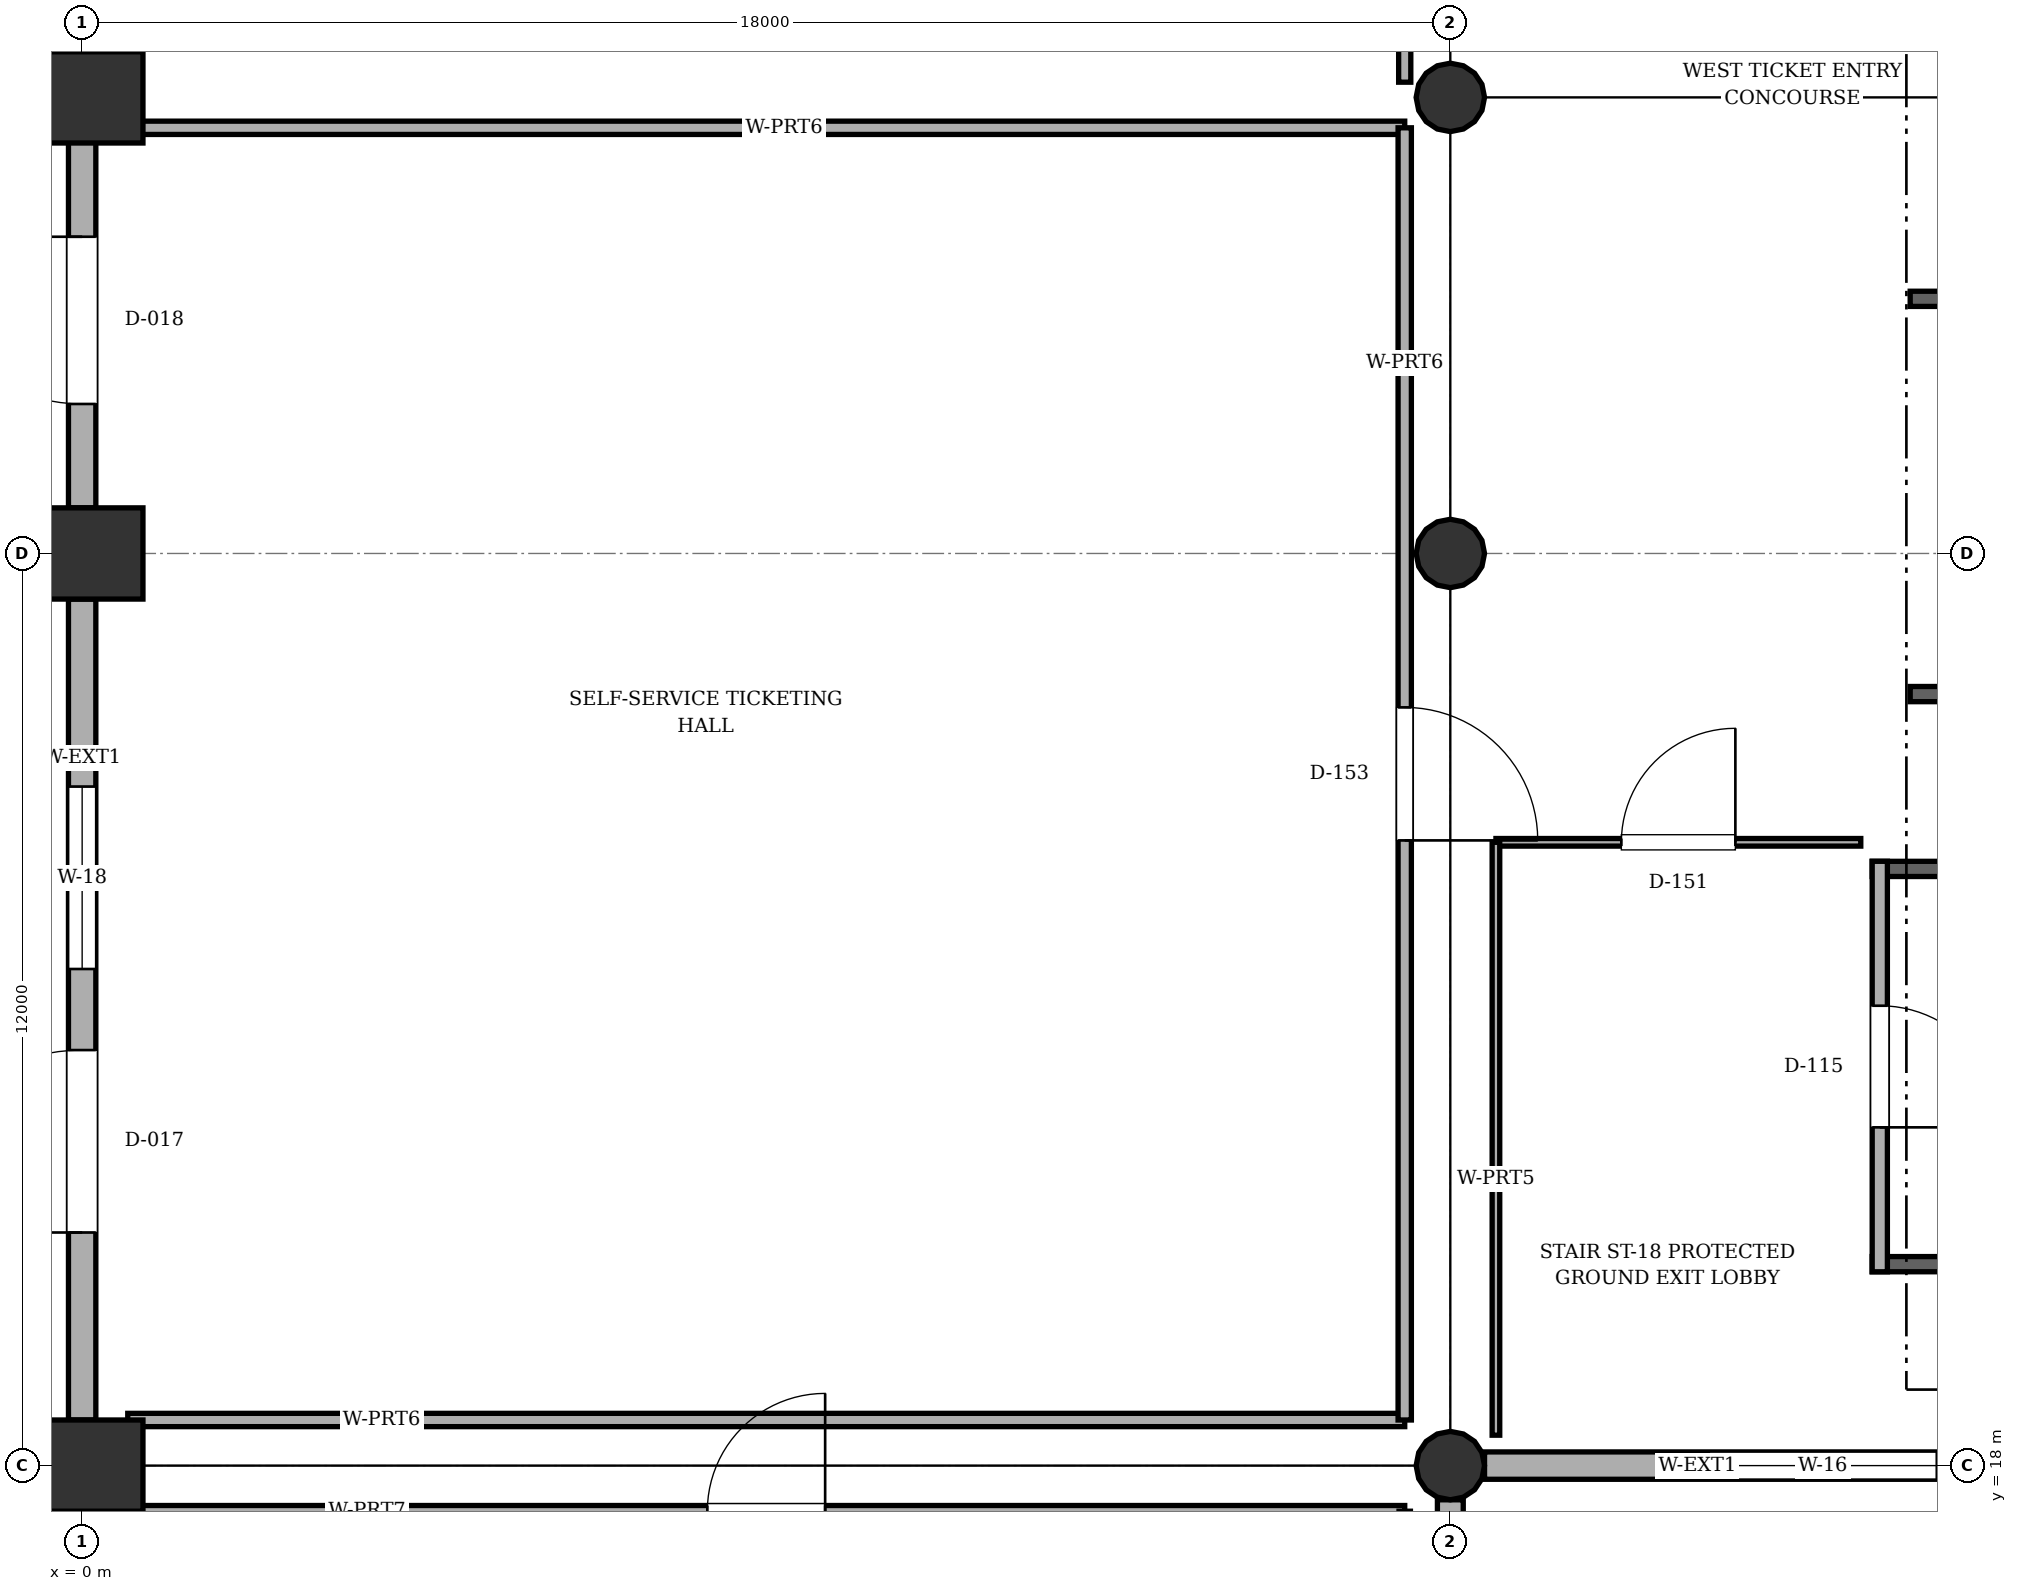
"""IFC4 building model, lengths in metres.
Left out: names, types, materials, properties, quantities, classifications, styles, units other than length and angle.
Written with IfcOpenShell. Run it as: python <this file> out.ifc"""

import sys

from ifc_helpers import new_model, si_unit, direction, frame, frame_2d, origin, origin_2d, place, context, subcontext, project, spatial, rectangle, circle, extrude, element, fill, save


model = new_model("IFC4")
c1 = context("Model", 3, precision=1e-05, world=origin(), true_north=direction((0.0, 1.0)))
c2 = subcontext(c1, "Body", "Model", "MODEL_VIEW")
j1 = project(units=[si_unit("LENGTHUNIT", "METRE"), si_unit("PLANEANGLEUNIT", "RADIAN")], contexts=[c1])
p1 = place(None, origin())
s1 = spatial("IfcSite", under=j1, at=p1, CompositionType="ELEMENT")
p2 = place(p1, origin())
s2 = spatial("IfcBuilding", under=s1, at=p2, CompositionType="ELEMENT")
p3 = place(p2, origin())
s3 = spatial("IfcBuildingStorey", under=s2, at=p3, CompositionType="ELEMENT", Elevation=0.0)
for number, where, z_axis, x_axis in (
    (1, (0.0, 18.0, 0.0), (0.0, 0.0, 1.0), (1.0, 0.0, 0.0)),
    (2, (0.0, 30.0, 0.0), (0.0, 0.0, 1.0), (1.0, 0.0, 0.0)),
    (3, (0.0, 36.0, 0.0), (0.0, 0.0, 1.0), (1.0, 0.0, 0.0)),
):
    element("IfcColumn", number, at=place(p3, frame(where, z_axis=z_axis, x_axis=x_axis)), inside=s3, PredefinedType="COLUMN", context=c2, shape_type="SweptSolid", body=[
        extrude(rectangle(XDim=1.6, YDim=1.2, at=origin_2d()), origin(), (0.0, 0.0, 1.0), 6.6),
    ])
for number, where, z_axis, x_axis in (
    (4, (18.0, 18.0, 0.0), (0.0, 0.0, 1.0), (1.0, 0.0, 0.0)),
    (5, (18.0, 30.0, 0.0), (0.0, 0.0, 1.0), (1.0, 0.0, 0.0)),
    (6, (18.0, 36.0, 0.0), (0.0, 0.0, 1.0), (1.0, 0.0, 0.0)),
):
    element("IfcColumn", number, at=place(p3, frame(where, z_axis=z_axis, x_axis=x_axis)), inside=s3, PredefinedType="COLUMN", context=c2, shape_type="SweptSolid", body=[
        extrude(circle(Radius=0.45, at=origin_2d()), origin(), (0.0, 0.0, 1.0), 6.6),
    ])
p4 = place(p3, frame((35.55, 18.0, 0.0), z_axis=(0.0, 0.0, 1.0), x_axis=(-1.0, 0.0, 0.0)))
e7 = element("IfcWall", 7, at=p4, inside=s3, PredefinedType="SOLIDWALL", context=c2, shape_type="SweptSolid", body=[
    extrude(rectangle(XDim=17.1, YDim=0.36, at=frame_2d((8.55, 0.0))), origin(), (0.0, 0.0, 1.0), 5.595),
])
p5 = place(p4, frame((3.25, 0.0, 0.0)))
e8 = element("IfcOpeningElement", 8, at=p5, cuts=e7, PredefinedType="OPENING", context=c2, shape_type="SweptSolid", body=[
    extrude(rectangle(XDim=2.4, YDim=2.5, at=frame_2d((1.2, 1.25))), frame((0.0, 0.19, 0.0), z_axis=(0.0, -1.0, 0.0), x_axis=(1.0, 0.0, 0.0)), (0.0, 0.0, 1.0), 0.38),
])
p6 = place(p4, frame((7.35, 0.0, 0.0)))
e9 = element("IfcOpeningElement", 9, at=p6, cuts=e7, PredefinedType="OPENING", context=c2, shape_type="SweptSolid", body=[
    extrude(rectangle(XDim=2.4, YDim=2.5, at=frame_2d((1.2, 1.25))), frame((0.0, 0.19, 0.0), z_axis=(0.0, -1.0, 0.0), x_axis=(1.0, 0.0, 0.0)), (0.0, 0.0, 1.0), 0.38),
])
p7 = place(p4, frame((11.15, 0.0, 0.95)))
e10 = element("IfcOpeningElement", 10, at=p7, cuts=e7, PredefinedType="OPENING", context=c2, shape_type="SweptSolid", body=[
    extrude(rectangle(XDim=3.0, YDim=2.1, at=frame_2d((1.5, 1.05))), frame((0.0, 0.19, 0.0), z_axis=(0.0, -1.0, 0.0), x_axis=(1.0, 0.0, 0.0)), (0.0, 0.0, 1.0), 0.38),
])
p8 = place(p3, frame((18.0, 17.55, 0.0), z_axis=(0.0, 0.0, 1.0), x_axis=(0.0, -1.0, 0.0)))
e11 = element("IfcWall", 11, at=p8, inside=s3, PredefinedType="SOLIDWALL", context=c2, shape_type="SweptSolid", body=[
    extrude(rectangle(XDim=17.1, YDim=0.34, at=frame_2d((8.55, 0.0))), origin(), (0.0, 0.0, 1.0), 5.595),
])
p9 = place(p8, frame((3.25, 0.0, 0.0)))
e12 = element("IfcOpeningElement", 12, at=p9, cuts=e11, PredefinedType="OPENING", context=c2, shape_type="SweptSolid", body=[
    extrude(rectangle(XDim=2.4, YDim=2.5, at=frame_2d((1.2, 1.25))), frame((0.0, 0.18, 0.0), z_axis=(0.0, -1.0, 0.0), x_axis=(1.0, 0.0, 0.0)), (0.0, 0.0, 1.0), 0.36),
])
p10 = place(p8, frame((9.55, 0.0, 0.95)))
e13 = element("IfcOpeningElement", 13, at=p10, cuts=e11, PredefinedType="OPENING", context=c2, shape_type="SweptSolid", body=[
    extrude(rectangle(XDim=1.6, YDim=1.9, at=frame_2d((0.8, 0.95))), frame((0.0, 0.18, 0.0), z_axis=(0.0, -1.0, 0.0), x_axis=(1.0, 0.0, 0.0)), (0.0, 0.0, 1.0), 0.36),
])
p11 = place(p3, frame((0.0, 0.45, 0.0), z_axis=(0.0, 0.0, 1.0), x_axis=(0.0, 1.0, 0.0)))
e14 = element("IfcWall", 14, at=p11, inside=s3, PredefinedType="SOLIDWALL", context=c2, shape_type="SweptSolid", body=[
    extrude(rectangle(XDim=16.95, YDim=0.36, at=frame_2d((8.475, 0.0))), origin(), (0.0, 0.0, 1.0), 5.67),
])
p12 = place(p11, frame((3.25, 0.0, 0.0)))
e15 = element("IfcOpeningElement", 15, at=p12, cuts=e14, PredefinedType="OPENING", context=c2, shape_type="SweptSolid", body=[
    extrude(rectangle(XDim=2.4, YDim=2.5, at=frame_2d((1.2, 1.25))), frame((0.0, 0.19, 0.0), z_axis=(0.0, -1.0, 0.0), x_axis=(1.0, 0.0, 0.0)), (0.0, 0.0, 1.0), 0.38),
])
p13 = place(p11, frame((9.55, 0.0, 0.95)))
e16 = element("IfcOpeningElement", 16, at=p13, cuts=e14, PredefinedType="OPENING", context=c2, shape_type="SweptSolid", body=[
    extrude(rectangle(XDim=3.0, YDim=2.1, at=frame_2d((1.5, 1.05))), frame((0.0, 0.19, 0.0), z_axis=(0.0, -1.0, 0.0), x_axis=(1.0, 0.0, 0.0)), (0.0, 0.0, 1.0), 0.38),
])
p14 = place(p11, frame((13.1, 0.0, 0.95)))
e17 = element("IfcOpeningElement", 17, at=p14, cuts=e14, PredefinedType="OPENING", context=c2, shape_type="SweptSolid", body=[
    extrude(rectangle(XDim=2.7, YDim=2.1, at=frame_2d((1.35, 1.05))), frame((0.0, 0.19, 0.0), z_axis=(0.0, -1.0, 0.0), x_axis=(1.0, 0.0, 0.0)), (0.0, 0.0, 1.0), 0.38),
])
p15 = place(p3, frame((0.0, 18.6, 0.0), z_axis=(0.0, 0.0, 1.0), x_axis=(0.0, 1.0, 0.0)))
e18 = element("IfcWall", 18, at=p15, inside=s3, PredefinedType="SOLIDWALL", context=c2, shape_type="SweptSolid", body=[
    extrude(rectangle(XDim=10.8, YDim=0.36, at=frame_2d((5.4, 0.0))), origin(), (0.0, 0.0, 1.0), 5.67),
])
p16 = place(p15, frame((2.467, 0.0, 0.0)))
e19 = element("IfcOpeningElement", 19, at=p16, cuts=e18, PredefinedType="OPENING", context=c2, shape_type="SweptSolid", body=[
    extrude(rectangle(XDim=2.4, YDim=2.5, at=frame_2d((1.2, 1.25))), frame((0.0, 0.19, 0.0), z_axis=(0.0, -1.0, 0.0), x_axis=(1.0, 0.0, 0.0)), (0.0, 0.0, 1.0), 0.38),
])
p17 = place(p15, frame((5.933, 0.0, 0.95)))
e20 = element("IfcOpeningElement", 20, at=p17, cuts=e18, PredefinedType="OPENING", context=c2, shape_type="SweptSolid", body=[
    extrude(rectangle(XDim=2.4, YDim=2.1, at=frame_2d((1.2, 1.05))), frame((0.0, 0.19, 0.0), z_axis=(0.0, -1.0, 0.0), x_axis=(1.0, 0.0, 0.0)), (0.0, 0.0, 1.0), 0.38),
])
p18 = place(p3, frame((0.0, 30.6, 0.0), z_axis=(0.0, 0.0, 1.0), x_axis=(0.0, 1.0, 0.0)))
e21 = element("IfcWall", 21, at=p18, inside=s3, PredefinedType="SOLIDWALL", context=c2, shape_type="SweptSolid", body=[
    extrude(rectangle(XDim=10.8, YDim=0.36, at=frame_2d((5.4, 0.0))), origin(), (0.0, 0.0, 1.0), 6.225),
])
p19 = place(p18, frame((1.367, 0.0, 0.0)))
e22 = element("IfcOpeningElement", 22, at=p19, cuts=e21, PredefinedType="OPENING", context=c2, shape_type="SweptSolid", body=[
    extrude(rectangle(XDim=2.2, YDim=2.45, at=frame_2d((1.1, 1.225))), frame((0.0, 0.19, 0.0), z_axis=(0.0, -1.0, 0.0), x_axis=(1.0, 0.0, 0.0)), (0.0, 0.0, 1.0), 0.38),
])
p20 = place(p18, frame((6.683, 0.0, 0.95)))
e23 = element("IfcOpeningElement", 23, at=p20, cuts=e21, PredefinedType="OPENING", context=c2, shape_type="SweptSolid", body=[
    extrude(rectangle(XDim=2.1, YDim=2.0, at=frame_2d((1.05, 1.0))), frame((0.0, 0.19, 0.0), z_axis=(0.0, -1.0, 0.0), x_axis=(1.0, 0.0, 0.0)), (0.0, 0.0, 1.0), 0.38),
])
for number, where, z_axis, x_axis in (
    (24, (23.55, 20.65, 0.0), (0.0, 0.0, 1.0), (1.0, 0.0, 0.0)),
    (25, (35.125, 25.85, 0.0), (0.0, 0.0, 1.0), (-1.0, 0.0, 0.0)),
):
    element("IfcWall", number, at=place(p3, frame(where, z_axis=z_axis, x_axis=x_axis)), inside=s3, PredefinedType="SOLIDWALL", context=c2, shape_type="SweptSolid", body=[
        extrude(rectangle(XDim=11.575, YDim=0.2, at=frame_2d((5.788, 0.0))), origin(), (0.0, 0.0, 1.0), 6.32),
    ])
p21 = place(p3, frame((23.65, 25.95, 0.0), z_axis=(0.0, 0.0, 1.0), x_axis=(0.0, -1.0, 0.0)))
e26 = element("IfcWall", 26, at=p21, inside=s3, PredefinedType="SOLIDWALL", context=c2, shape_type="SweptSolid", body=[
    extrude(rectangle(XDim=5.4, YDim=0.2, at=frame_2d((2.7, 0.0))), origin(), (0.0, 0.0, 1.0), 4.4),
])
p22 = place(p21, frame((1.9, 0.0, 0.0)))
e27 = element("IfcOpeningElement", 27, at=p22, cuts=e26, PredefinedType="OPENING", context=c2, shape_type="SweptSolid", body=[
    extrude(rectangle(XDim=1.6, YDim=2.15, at=frame_2d((0.8, 1.075))), frame((0.0, 0.11, 0.0), z_axis=(0.0, -1.0, 0.0), x_axis=(1.0, 0.0, 0.0)), (0.0, 0.0, 1.0), 0.22),
])
for number, where, z_axis, x_axis in (
    (28, (24.05, 28.15, 0.0), (0.0, 0.0, 1.0), (1.0, 0.0, 0.0)),
    (29, (33.225, 33.35, 0.0), (0.0, 0.0, 1.0), (-1.0, 0.0, 0.0)),
):
    element("IfcWall", number, at=place(p3, frame(where, z_axis=z_axis, x_axis=x_axis)), inside=s3, PredefinedType="SOLIDWALL", context=c2, shape_type="SweptSolid", body=[
        extrude(rectangle(XDim=9.175, YDim=0.2, at=frame_2d((4.587, 0.0))), origin(), (0.0, 0.0, 1.0), 6.32),
    ])
p23 = place(p3, frame((18.6, 26.2, 0.0), z_axis=(0.0, 0.0, 1.0), x_axis=(1.0, 0.0, 0.0)))
e30 = element("IfcWall", 30, at=p23, inside=s3, PredefinedType="PARTITIONING", context=c2, shape_type="SweptSolid", body=[
    extrude(rectangle(XDim=4.8, YDim=0.1, at=frame_2d((2.4, 0.0))), origin(), (0.0, 0.0, 1.0), 4.4),
])
p24 = place(p23, frame((1.65, 0.0, 0.0)))
e31 = element("IfcOpeningElement", 31, at=p24, cuts=e30, PredefinedType="OPENING", context=c2, shape_type="SweptSolid", body=[
    extrude(rectangle(XDim=1.5, YDim=2.15, at=frame_2d((0.75, 1.075))), frame((0.0, 0.06, 0.0), z_axis=(0.0, -1.0, 0.0), x_axis=(1.0, 0.0, 0.0)), (0.0, 0.0, 1.0), 0.12),
])
p25 = place(p3, frame((18.6, 18.4, 0.0), z_axis=(0.0, 0.0, 1.0), x_axis=(0.0, 1.0, 0.0)))
e32 = element("IfcWall", 32, at=p25, inside=s3, PredefinedType="PARTITIONING", context=c2, shape_type="SweptSolid", body=[
    extrude(rectangle(XDim=7.8, YDim=0.1, at=frame_2d((3.9, 0.0))), origin(), (0.0, 0.0, 1.0), 4.4),
])
for number, where, z_axis, x_axis in (
    (33, (17.4, 18.6, 0.0), (0.0, 0.0, 1.0), (-1.0, 0.0, 0.0)),
    (34, (0.6, 35.6, 0.0), (0.0, 0.0, 1.0), (1.0, 0.0, 0.0)),
):
    element("IfcWall", number, at=place(p3, frame(where, z_axis=z_axis, x_axis=x_axis)), inside=s3, PredefinedType="PARTITIONING", context=c2, shape_type="SweptSolid", body=[
        extrude(rectangle(XDim=16.8, YDim=0.175, at=frame_2d((8.4, 0.0))), origin(), (0.0, 0.0, 1.0), 4.4),
    ])
p26 = place(p3, frame((17.4, 35.6, 0.0), z_axis=(0.0, 0.0, 1.0), x_axis=(0.0, -1.0, 0.0)))
e35 = element("IfcWall", 35, at=p26, inside=s3, PredefinedType="PARTITIONING", context=c2, shape_type="SweptSolid", body=[
    extrude(rectangle(XDim=17.0, YDim=0.175, at=frame_2d((8.5, 0.0))), origin(), (0.0, 0.0, 1.0), 4.4),
])
p27 = place(p26, frame((7.625, 0.0, 0.0)))
e36 = element("IfcOpeningElement", 36, at=p27, cuts=e35, PredefinedType="OPENING", context=c2, shape_type="SweptSolid", body=[
    extrude(rectangle(XDim=1.75, YDim=2.1, at=frame_2d((0.875, 1.05))), frame((0.0, 0.097, 0.0), z_axis=(0.0, -1.0, 0.0), x_axis=(1.0, 0.0, 0.0)), (0.0, 0.0, 1.0), 0.195),
])
p28 = place(p3, frame((17.4, 53.6, 0.0), z_axis=(0.0, 0.0, 1.0), x_axis=(0.0, -1.0, 0.0)))
e37 = element("IfcWall", 37, at=p28, inside=s3, PredefinedType="PARTITIONING", context=c2, shape_type="SweptSolid", body=[
    extrude(rectangle(XDim=17.4, YDim=0.16, at=frame_2d((8.7, 0.0))), origin(), (0.0, 0.0, 1.0), 4.4),
])
p29 = place(p28, frame((7.825, 0.0, 0.0)))
e38 = element("IfcOpeningElement", 38, at=p29, cuts=e37, PredefinedType="OPENING", context=c2, shape_type="SweptSolid", body=[
    extrude(rectangle(XDim=1.75, YDim=2.1, at=frame_2d((0.875, 1.05))), frame((0.0, 0.09, 0.0), z_axis=(0.0, -1.0, 0.0), x_axis=(1.0, 0.0, 0.0)), (0.0, 0.0, 1.0), 0.18),
])
p30 = place(p3, frame((0.6, 17.4, 0.0), z_axis=(0.0, 0.0, 1.0), x_axis=(1.0, 0.0, 0.0)))
e39 = element("IfcWall", 39, at=p30, inside=s3, PredefinedType="PARTITIONING", context=c2, shape_type="SweptSolid", body=[
    extrude(rectangle(XDim=16.8, YDim=0.15, at=frame_2d((8.4, 0.0))), origin(), (0.0, 0.0, 1.0), 4.4),
])
p31 = place(p30, frame((7.625, 0.0, 0.0)))
e40 = element("IfcOpeningElement", 40, at=p31, cuts=e39, PredefinedType="OPENING", context=c2, shape_type="SweptSolid", body=[
    extrude(rectangle(XDim=1.55, YDim=2.1, at=frame_2d((0.775, 1.05))), frame((0.0, 0.085, 0.0), z_axis=(0.0, -1.0, 0.0), x_axis=(1.0, 0.0, 0.0)), (0.0, 0.0, 1.0), 0.17),
])
p32 = place(p7, origin())
e41 = element("IfcWindow", 41, at=p32, inside=s3, PartitioningType="SINGLE_PANEL", PredefinedType="WINDOW", context=c2, shape_type="SweptSolid", body=[
    extrude(rectangle(XDim=3.0, YDim=2.1, at=frame_2d((1.5, 1.05))), frame((0.0, 0.03, 0.0), z_axis=(0.0, -1.0, 0.0), x_axis=(1.0, 0.0, 0.0)), (0.0, 0.0, 1.0), 0.06),
])
fill(e10, e41)
p33 = place(p16, origin())
e42 = element("IfcDoor", 42, at=p33, inside=s3, OperationType="SINGLE_SWING_LEFT", PredefinedType="DOOR", context=c2, shape_type="SweptSolid", body=[
    extrude(rectangle(XDim=2.4, YDim=2.5, at=frame_2d((1.2, 1.25))), frame((0.0, 0.025, 0.0), z_axis=(0.0, -1.0, 0.0), x_axis=(1.0, 0.0, 0.0)), (0.0, 0.0, 1.0), 0.05),
])
fill(e19, e42)
p34 = place(p17, origin())
e43 = element("IfcWindow", 43, at=p34, inside=s3, PartitioningType="SINGLE_PANEL", PredefinedType="WINDOW", context=c2, shape_type="SweptSolid", body=[
    extrude(rectangle(XDim=2.4, YDim=2.1, at=frame_2d((1.2, 1.05))), frame((0.0, 0.03, 0.0), z_axis=(0.0, -1.0, 0.0), x_axis=(1.0, 0.0, 0.0)), (0.0, 0.0, 1.0), 0.06),
])
fill(e20, e43)
p35 = place(p19, origin())
e44 = element("IfcDoor", 44, at=p35, inside=s3, OperationType="SINGLE_SWING_RIGHT", PredefinedType="DOOR", context=c2, shape_type="SweptSolid", body=[
    extrude(rectangle(XDim=2.2, YDim=2.45, at=frame_2d((1.1, 1.225))), frame((0.0, 0.025, 0.0), z_axis=(0.0, -1.0, 0.0), x_axis=(1.0, 0.0, 0.0)), (0.0, 0.0, 1.0), 0.05),
])
fill(e22, e44)
p36 = place(p22, origin())
e45 = element("IfcDoor", 45, at=p36, inside=s3, OperationType="SINGLE_SWING_RIGHT", PredefinedType="DOOR", context=c2, shape_type="SweptSolid", body=[
    extrude(rectangle(XDim=1.6, YDim=2.15, at=frame_2d((0.8, 1.075))), frame((0.0, 0.025, 0.0), z_axis=(0.0, -1.0, 0.0), x_axis=(1.0, 0.0, 0.0)), (0.0, 0.0, 1.0), 0.05),
])
fill(e27, e45)
p37 = place(p24, origin())
e46 = element("IfcDoor", 46, at=p37, inside=s3, OperationType="SINGLE_SWING_RIGHT", PredefinedType="DOOR", context=c2, shape_type="SweptSolid", body=[
    extrude(rectangle(XDim=1.5, YDim=2.15, at=frame_2d((0.75, 1.075))), frame((0.0, 0.025, 0.0), z_axis=(0.0, -1.0, 0.0), x_axis=(1.0, 0.0, 0.0)), (0.0, 0.0, 1.0), 0.05),
])
fill(e31, e46)
p38 = place(p27, origin())
e47 = element("IfcDoor", 47, at=p38, inside=s3, OperationType="SINGLE_SWING_RIGHT", PredefinedType="DOOR", context=c2, shape_type="SweptSolid", body=[
    extrude(rectangle(XDim=1.75, YDim=2.1, at=frame_2d((0.875, 1.05))), frame((0.0, 0.025, 0.0), z_axis=(0.0, -1.0, 0.0), x_axis=(1.0, 0.0, 0.0)), (0.0, 0.0, 1.0), 0.05),
])
fill(e36, e47)
p39 = place(p31, origin())
e48 = element("IfcDoor", 48, at=p39, inside=s3, OperationType="SINGLE_SWING_RIGHT", PredefinedType="DOOR", context=c2, shape_type="SweptSolid", body=[
    extrude(rectangle(XDim=1.55, YDim=2.1, at=frame_2d((0.775, 1.05))), frame((0.0, 0.025, 0.0), z_axis=(0.0, -1.0, 0.0), x_axis=(1.0, 0.0, 0.0)), (0.0, 0.0, 1.0), 0.05),
])
fill(e40, e48)
save(model, sys.argv[1])
